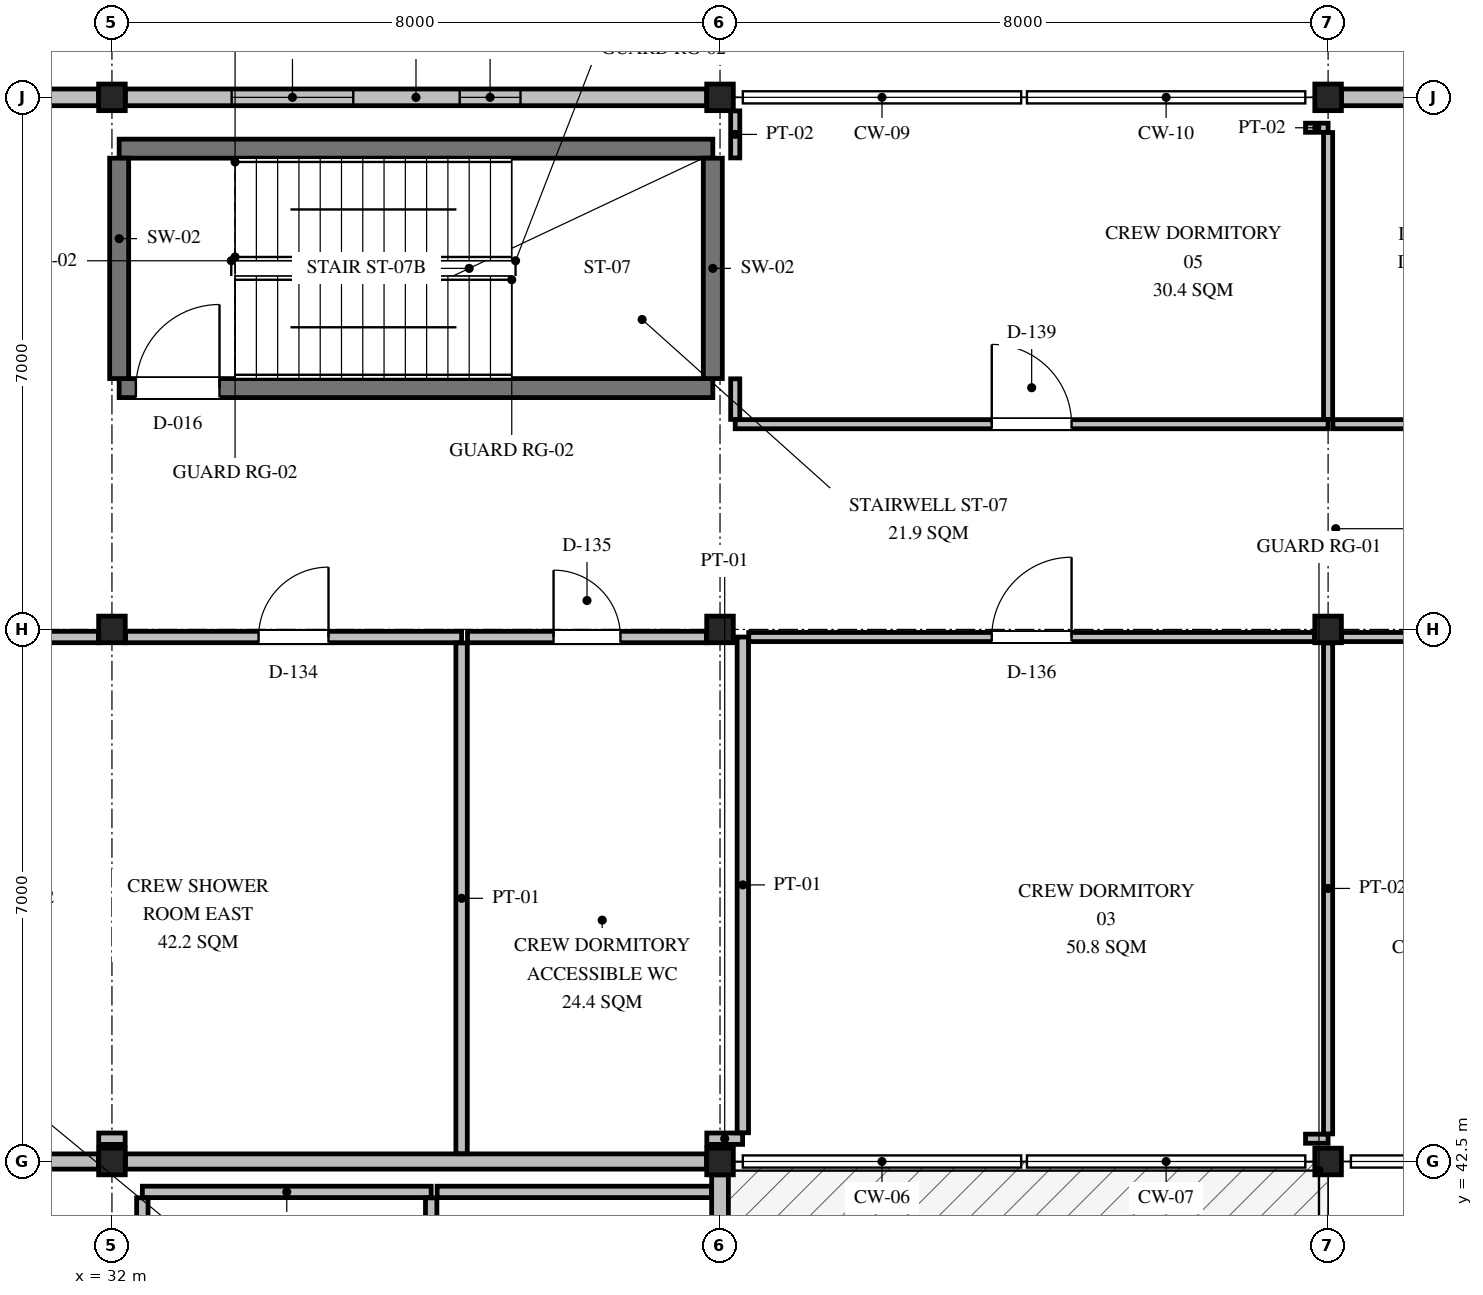
"""IFC4 building model, lengths in metres.
Left out: names, types, materials, properties, quantities, classifications, styles, units other than length and angle.
Written with IfcOpenShell. Run it as: python <this file> out.ifc"""

import sys

from ifc_helpers import new_model, si_unit, direction, frame, frame_2d, origin, origin_2d, place, context, subcontext, project, spatial, rectangle, i_section, extrude, element, fill, save


model = new_model("IFC4")
c1 = context("Model", 3, precision=1e-05, world=origin(), true_north=direction((0.0, 1.0)))
c2 = subcontext(c1, "Body", "Model", "MODEL_VIEW")
j1 = project(units=[si_unit("LENGTHUNIT", "METRE"), si_unit("PLANEANGLEUNIT", "RADIAN")], contexts=[c1])
p1 = place(None, origin())
s1 = spatial("IfcSite", under=j1, at=p1, CompositionType="ELEMENT")
p2 = place(p1, origin())
s2 = spatial("IfcBuilding", under=s1, at=p2, CompositionType="ELEMENT")
p3 = place(p2, frame((0.0, 0.0, 5.85)))
s3 = spatial("IfcBuildingStorey", under=s2, at=p3, CompositionType="ELEMENT", Elevation=5.85)
for number, where, z_axis, x_axis in (
    (1, (32.0, 42.5, 0.0), (0.0, 0.0, 1.0), (1.0, 0.0, 0.0)),
    (2, (32.0, 49.5, 0.0), (0.0, 0.0, 1.0), (1.0, 0.0, 0.0)),
    (3, (32.0, 56.5, 0.0), (0.0, 0.0, 1.0), (1.0, 0.0, 0.0)),
    (4, (40.0, 42.5, 0.0), (0.0, 0.0, 1.0), (1.0, 0.0, 0.0)),
    (5, (40.0, 49.5, 0.0), (0.0, 0.0, 1.0), (1.0, 0.0, 0.0)),
    (6, (40.0, 56.5, 0.0), (0.0, 0.0, 1.0), (1.0, 0.0, 0.0)),
    (7, (48.0, 42.5, 0.0), (0.0, 0.0, 1.0), (1.0, 0.0, 0.0)),
    (8, (48.0, 49.5, 0.0), (0.0, 0.0, 1.0), (1.0, 0.0, 0.0)),
    (9, (48.0, 56.5, 0.0), (0.0, 0.0, 1.0), (1.0, 0.0, 0.0)),
):
    element("IfcColumn", number, at=place(p3, frame(where, z_axis=z_axis, x_axis=x_axis)), inside=s3, PredefinedType="COLUMN", context=c2, shape_type="SweptSolid", body=[
        extrude(i_section(OverallWidth=0.35, OverallDepth=0.35, WebThickness=0.012, FlangeThickness=0.019, FilletRadius=0.02, at=origin_2d()), origin(), (0.0, 0.0, 1.0), 4.2),
    ])
p4 = place(p3, frame((40.0, 22.625, 0.0), z_axis=(0.0, 0.0, 1.0), x_axis=(0.0, 1.0, 0.0)))
e10 = element("IfcWall", 10, at=p4, inside=s3, PredefinedType="SOLIDWALL", context=c2, shape_type="SweptSolid", body=[
    extrude(rectangle(XDim=19.7, YDim=0.22, at=frame_2d((9.85, 0.0))), origin(), (0.0, 0.0, 1.0), 3.294),
])
p5 = place(p4, frame((14.0, 0.0, 0.0)))
e11 = element("IfcOpeningElement", 11, at=p5, cuts=e10, PredefinedType="OPENING", context=c2, shape_type="SweptSolid", body=[
    extrude(rectangle(XDim=1.15, YDim=2.2, at=frame_2d((0.575, 1.1))), frame((0.0, 0.12, 0.0), z_axis=(0.0, -1.0, 0.0), x_axis=(1.0, 0.0, 0.0)), (0.0, 0.0, 1.0), 0.24),
])
p6 = place(p4, frame((3.0, 0.0, 1.0)))
e12 = element("IfcOpeningElement", 12, at=p6, cuts=e10, PredefinedType="OPENING", context=c2, shape_type="SweptSolid", body=[
    extrude(rectangle(XDim=1.75, YDim=1.3, at=frame_2d((0.875, 0.65))), frame((0.0, 0.12, 0.0), z_axis=(0.0, -1.0, 0.0), x_axis=(1.0, 0.0, 0.0)), (0.0, 0.0, 1.0), 0.24),
])
p7 = place(p3, frame((24.175, 56.5, 0.0), z_axis=(0.0, 0.0, 1.0), x_axis=(1.0, 0.0, 0.0)))
e13 = element("IfcWall", 13, at=p7, inside=s3, PredefinedType="SOLIDWALL", context=c2, shape_type="SweptSolid", body=[
    extrude(rectangle(XDim=7.65, YDim=0.22, at=frame_2d((3.825, 0.0))), origin(), (0.0, 0.0, 1.0), 3.344),
])
p8 = place(p7, frame((1.4, 0.0, 0.95)))
e14 = element("IfcOpeningElement", 14, at=p8, cuts=e13, PredefinedType="OPENING", context=c2, shape_type="SweptSolid", body=[
    extrude(rectangle(XDim=2.4, YDim=1.5, at=frame_2d((1.2, 0.75))), frame((0.0, 0.12, 0.0), z_axis=(0.0, -1.0, 0.0), x_axis=(1.0, 0.0, 0.0)), (0.0, 0.0, 1.0), 0.24),
])
p9 = place(p7, frame((4.4, 0.0, 0.95)))
e15 = element("IfcOpeningElement", 15, at=p9, cuts=e13, PredefinedType="OPENING", context=c2, shape_type="SweptSolid", body=[
    extrude(rectangle(XDim=2.1, YDim=2.1, at=frame_2d((1.05, 1.05))), frame((0.0, 0.12, 0.0), z_axis=(0.0, -1.0, 0.0), x_axis=(1.0, 0.0, 0.0)), (0.0, 0.0, 1.0), 0.24),
])
p10 = place(p3, frame((32.175, 56.5, 0.0), z_axis=(0.0, 0.0, 1.0), x_axis=(1.0, 0.0, 0.0)))
e16 = element("IfcWall", 16, at=p10, inside=s3, PredefinedType="SOLIDWALL", context=c2, shape_type="SweptSolid", body=[
    extrude(rectangle(XDim=7.65, YDim=0.22, at=frame_2d((3.825, 0.0))), origin(), (0.0, 0.0, 1.0), 3.394),
])
p11 = place(p10, frame((1.4, 0.0, 0.95)))
e17 = element("IfcOpeningElement", 17, at=p11, cuts=e16, PredefinedType="OPENING", context=c2, shape_type="SweptSolid", body=[
    extrude(rectangle(XDim=1.6, YDim=1.8, at=frame_2d((0.8, 0.9))), frame((0.0, 0.12, 0.0), z_axis=(0.0, -1.0, 0.0), x_axis=(1.0, 0.0, 0.0)), (0.0, 0.0, 1.0), 0.24),
])
p12 = place(p10, frame((4.4, 0.0, 0.95)))
e18 = element("IfcOpeningElement", 18, at=p12, cuts=e16, PredefinedType="OPENING", context=c2, shape_type="SweptSolid", body=[
    extrude(rectangle(XDim=0.8, YDim=1.3, at=frame_2d((0.4, 0.65))), frame((0.0, 0.12, 0.0), z_axis=(0.0, -1.0, 0.0), x_axis=(1.0, 0.0, 0.0)), (0.0, 0.0, 1.0), 0.24),
])
p13 = place(p3, frame((48.175, 56.5, 0.0), z_axis=(0.0, 0.0, 1.0), x_axis=(1.0, 0.0, 0.0)))
e19 = element("IfcWall", 19, at=p13, inside=s3, PredefinedType="SOLIDWALL", context=c2, shape_type="SweptSolid", body=[
    extrude(rectangle(XDim=7.65, YDim=0.22, at=frame_2d((3.825, 0.0))), origin(), (0.0, 0.0, 1.0), 3.494),
])
p14 = place(p13, frame((1.4, 0.0, 0.95)))
e20 = element("IfcOpeningElement", 20, at=p14, cuts=e19, PredefinedType="OPENING", context=c2, shape_type="SweptSolid", body=[
    extrude(rectangle(XDim=2.8, YDim=1.8, at=frame_2d((1.4, 0.9))), frame((0.0, 0.12, 0.0), z_axis=(0.0, -1.0, 0.0), x_axis=(1.0, 0.0, 0.0)), (0.0, 0.0, 1.0), 0.24),
])
p15 = place(p13, frame((4.4, 0.0, 0.95)))
e21 = element("IfcOpeningElement", 21, at=p15, cuts=e19, PredefinedType="OPENING", context=c2, shape_type="SweptSolid", body=[
    extrude(rectangle(XDim=2.15, YDim=1.3, at=frame_2d((1.075, 0.65))), frame((0.0, 0.12, 0.0), z_axis=(0.0, -1.0, 0.0), x_axis=(1.0, 0.0, 0.0)), (0.0, 0.0, 1.0), 0.24),
])
p16 = place(p3, frame((32.095, 52.675, 0.0), z_axis=(0.0, 0.0, 1.0), x_axis=(1.0, 0.0, 0.0)))
e22 = element("IfcWall", 22, at=p16, inside=s3, PredefinedType="SHEAR", context=c2, shape_type="SweptSolid", body=[
    extrude(rectangle(XDim=7.81, YDim=0.25, at=frame_2d((3.905, 0.0))), origin(), (0.0, 0.0, 1.0), 4.0),
])
p17 = place(p16, frame((0.22, 0.0, 0.0)))
e23 = element("IfcOpeningElement", 23, at=p17, cuts=e22, PredefinedType="OPENING", context=c2, shape_type="SweptSolid", body=[
    extrude(rectangle(XDim=1.1, YDim=2.15, at=frame_2d((0.55, 1.075))), frame((0.0, 0.135, 0.0), z_axis=(0.0, -1.0, 0.0), x_axis=(1.0, 0.0, 0.0)), (0.0, 0.0, 1.0), 0.27),
])
p18 = place(p3, frame((32.095, 55.825, 0.0), z_axis=(0.0, 0.0, 1.0), x_axis=(1.0, 0.0, 0.0)))
e24 = element("IfcWall", 24, at=p18, inside=s3, PredefinedType="SHEAR", context=c2, shape_type="SweptSolid", body=[
    extrude(rectangle(XDim=7.81, YDim=0.25, at=frame_2d((3.905, 0.0))), origin(), (0.0, 0.0, 1.0), 4.0),
])
for number, where, z_axis, x_axis in (
    (25, (32.095, 52.8, 0.0), (0.0, 0.0, 1.0), (0.0, 1.0, 0.0)),
    (26, (39.905, 52.8, 0.0), (0.0, 0.0, 1.0), (0.0, 1.0, 0.0)),
):
    element("IfcWall", number, at=place(p3, frame(where, z_axis=z_axis, x_axis=x_axis)), inside=s3, PredefinedType="SHEAR", context=c2, shape_type="SweptSolid", body=[
        extrude(rectangle(XDim=2.9, YDim=0.25, at=frame_2d((1.45, 0.0))), origin(), (0.0, 0.0, 1.0), 4.0),
    ])
p19 = place(p3, frame((24.177, 42.5, 0.0), z_axis=(0.0, 0.0, 1.0), x_axis=(1.0, 0.0, 0.0)))
e27 = element("IfcWall", 27, at=p19, inside=s3, PredefinedType="PARTITIONING", context=c2, shape_type="SweptSolid", body=[
    extrude(rectangle(XDim=7.646, YDim=0.2, at=frame_2d((3.823, 0.0))), origin(), (0.0, 0.0, 1.0), 3.594),
])
p20 = place(p3, frame((32.177, 42.5, 0.0), z_axis=(0.0, 0.0, 1.0), x_axis=(1.0, 0.0, 0.0)))
e28 = element("IfcWall", 28, at=p20, inside=s3, PredefinedType="PARTITIONING", context=c2, shape_type="SweptSolid", body=[
    extrude(rectangle(XDim=7.646, YDim=0.2, at=frame_2d((3.823, 0.0))), origin(), (0.0, 0.0, 1.0), 3.604),
])
p21 = place(p3, frame((32.4, 42.1, 0.0), z_axis=(0.0, 0.0, 1.0), x_axis=(1.0, 0.0, 0.0)))
e29 = element("IfcWall", 29, at=p21, inside=s3, PredefinedType="PARTITIONING", context=c2, shape_type="SweptSolid", body=[
    extrude(rectangle(XDim=3.8, YDim=0.15, at=frame_2d((1.9, 0.0))), origin(), (0.0, 0.0, 1.0), 4.0),
])
p22 = place(p3, frame((32.4, 37.978, 0.0), z_axis=(0.0, 0.0, 1.0), x_axis=(0.0, 1.0, 0.0)))
e30 = element("IfcWall", 30, at=p22, inside=s3, PredefinedType="PARTITIONING", context=c2, shape_type="SweptSolid", body=[
    extrude(rectangle(XDim=4.044, YDim=0.15, at=frame_2d((2.022, 0.0))), origin(), (0.0, 0.0, 1.0), 4.0),
])
p23 = place(p3, frame((36.2, 37.978, 0.0), z_axis=(0.0, 0.0, 1.0), x_axis=(0.0, 1.0, 0.0)))
e31 = element("IfcWall", 31, at=p23, inside=s3, PredefinedType="PARTITIONING", context=c2, shape_type="SweptSolid", body=[
    extrude(rectangle(XDim=4.044, YDim=0.15, at=frame_2d((2.022, 0.0))), origin(), (0.0, 0.0, 1.0), 3.7),
])
p24 = place(p3, frame((36.278, 42.1, 0.0), z_axis=(0.0, 0.0, 1.0), x_axis=(1.0, 0.0, 0.0)))
e32 = element("IfcWall", 32, at=p24, inside=s3, PredefinedType="PARTITIONING", context=c2, shape_type="SweptSolid", body=[
    extrude(rectangle(XDim=3.609, YDim=0.15, at=frame_2d((1.804, 0.0))), origin(), (0.0, 0.0, 1.0), 4.0),
])
p25 = place(p3, frame((31.826, 42.8, 0.0), z_axis=(0.0, 0.0, 1.0), x_axis=(1.0, 0.0, 0.0)))
e33 = element("IfcWall", 33, at=p25, inside=s3, PredefinedType="PARTITIONING", context=c2, shape_type="SweptSolid", body=[
    extrude(rectangle(XDim=0.348, YDim=0.15, at=frame_2d((0.174, 0.0))), origin(), (0.0, 0.0, 1.0), 4.0),
])
p26 = place(p3, frame((30.263, 49.4, 0.0), z_axis=(0.0, 0.0, 1.0), x_axis=(1.0, 0.0, 0.0)))
e34 = element("IfcWall", 34, at=p26, inside=s3, PredefinedType="PARTITIONING", context=c2, shape_type="SweptSolid", body=[
    extrude(rectangle(XDim=1.559, YDim=0.15, at=frame_2d((0.78, 0.0))), origin(), (0.0, 0.0, 1.0), 3.494),
])
p27 = place(p3, frame((32.178, 49.4, 0.0), z_axis=(0.0, 0.0, 1.0), x_axis=(1.0, 0.0, 0.0)))
e35 = element("IfcWall", 35, at=p27, inside=s3, PredefinedType="PARTITIONING", context=c2, shape_type="SweptSolid", body=[
    extrude(rectangle(XDim=4.422, YDim=0.15, at=frame_2d((2.211, 0.0))), origin(), (0.0, 0.0, 1.0), 3.544),
])
p28 = place(p27, frame((1.751, 0.0, 0.0)))
e36 = element("IfcOpeningElement", 36, at=p28, cuts=e35, PredefinedType="OPENING", context=c2, shape_type="SweptSolid", body=[
    extrude(rectangle(XDim=0.92, YDim=2.1, at=frame_2d((0.46, 1.05))), frame((0.0, 0.085, 0.0), z_axis=(0.0, -1.0, 0.0), x_axis=(1.0, 0.0, 0.0)), (0.0, 0.0, 1.0), 0.17),
])
p29 = place(p3, frame((36.6, 42.603, 0.0), z_axis=(0.0, 0.0, 1.0), x_axis=(0.0, 1.0, 0.0)))
e37 = element("IfcWall", 37, at=p29, inside=s3, PredefinedType="PARTITIONING", context=c2, shape_type="SweptSolid", body=[
    extrude(rectangle(XDim=6.719, YDim=0.15, at=frame_2d((3.359, 0.0))), origin(), (0.0, 0.0, 1.0), 4.0),
])
p30 = place(p3, frame((39.826, 42.8, 0.0), z_axis=(0.0, 0.0, 1.0), x_axis=(1.0, 0.0, 0.0)))
e38 = element("IfcWall", 38, at=p30, inside=s3, PredefinedType="PARTITIONING", context=c2, shape_type="SweptSolid", body=[
    extrude(rectangle(XDim=0.471, YDim=0.15, at=frame_2d((0.236, 0.0))), origin(), (0.0, 0.0, 1.0), 4.0),
])
p31 = place(p3, frame((36.678, 49.4, 0.0), z_axis=(0.0, 0.0, 1.0), x_axis=(1.0, 0.0, 0.0)))
e39 = element("IfcWall", 39, at=p31, inside=s3, PredefinedType="PARTITIONING", context=c2, shape_type="SweptSolid", body=[
    extrude(rectangle(XDim=3.144, YDim=0.15, at=frame_2d((1.572, 0.0))), origin(), (0.0, 0.0, 1.0), 3.544),
])
p32 = place(p31, frame((1.132, 0.0, 0.0)))
e40 = element("IfcOpeningElement", 40, at=p32, cuts=e39, PredefinedType="OPENING", context=c2, shape_type="SweptSolid", body=[
    extrude(rectangle(XDim=0.88, YDim=2.1, at=frame_2d((0.44, 1.05))), frame((0.0, 0.085, 0.0), z_axis=(0.0, -1.0, 0.0), x_axis=(1.0, 0.0, 0.0)), (0.0, 0.0, 1.0), 0.17),
])
p33 = place(p3, frame((40.3, 42.878, 0.0), z_axis=(0.0, 0.0, 1.0), x_axis=(0.0, 1.0, 0.0)))
e41 = element("IfcWall", 41, at=p33, inside=s3, PredefinedType="PARTITIONING", context=c2, shape_type="SweptSolid", body=[
    extrude(rectangle(XDim=6.522, YDim=0.15, at=frame_2d((3.261, 0.0))), origin(), (0.0, 0.0, 1.0), 4.0),
])
p34 = place(p3, frame((47.703, 42.8, 0.0), z_axis=(0.0, 0.0, 1.0), x_axis=(1.0, 0.0, 0.0)))
e42 = element("IfcWall", 42, at=p34, inside=s3, PredefinedType="PARTITIONING", context=c2, shape_type="SweptSolid", body=[
    extrude(rectangle(XDim=0.297, YDim=0.12, at=frame_2d((0.148, 0.0))), origin(), (0.0, 0.0, 1.0), 4.0),
])
p35 = place(p3, frame((40.378, 49.4, 0.0), z_axis=(0.0, 0.0, 1.0), x_axis=(1.0, 0.0, 0.0)))
e43 = element("IfcWall", 43, at=p35, inside=s3, PredefinedType="PARTITIONING", context=c2, shape_type="SweptSolid", body=[
    extrude(rectangle(XDim=7.444, YDim=0.12, at=frame_2d((3.722, 0.0))), origin(), (0.0, 0.0, 1.0), 3.494),
])
p36 = place(p35, frame((3.197, 0.0, 0.0)))
e44 = element("IfcOpeningElement", 44, at=p36, cuts=e43, PredefinedType="OPENING", context=c2, shape_type="SweptSolid", body=[
    extrude(rectangle(XDim=1.05, YDim=2.1, at=frame_2d((0.525, 1.05))), frame((0.0, 0.07, 0.0), z_axis=(0.0, -1.0, 0.0), x_axis=(1.0, 0.0, 0.0)), (0.0, 0.0, 1.0), 0.14),
])
p37 = place(p3, frame((48.0, 42.863, 0.0), z_axis=(0.0, 0.0, 1.0), x_axis=(0.0, 1.0, 0.0)))
e45 = element("IfcWall", 45, at=p37, inside=s3, PredefinedType="PARTITIONING", context=c2, shape_type="SweptSolid", body=[
    extrude(rectangle(XDim=6.459, YDim=0.12, at=frame_2d((3.229, 0.0))), origin(), (0.0, 0.0, 1.0), 3.444),
])
p38 = place(p3, frame((48.178, 49.4, 0.0), z_axis=(0.0, 0.0, 1.0), x_axis=(1.0, 0.0, 0.0)))
e46 = element("IfcWall", 46, at=p38, inside=s3, PredefinedType="PARTITIONING", context=c2, shape_type="SweptSolid", body=[
    extrude(rectangle(XDim=7.644, YDim=0.12, at=frame_2d((3.822, 0.0))), origin(), (0.0, 0.0, 1.0), 3.554),
])
p39 = place(p38, frame((3.297, 0.0, 0.0)))
e47 = element("IfcOpeningElement", 47, at=p39, cuts=e46, PredefinedType="OPENING", context=c2, shape_type="SweptSolid", body=[
    extrude(rectangle(XDim=1.05, YDim=2.1, at=frame_2d((0.525, 1.05))), frame((0.0, 0.07, 0.0), z_axis=(0.0, -1.0, 0.0), x_axis=(1.0, 0.0, 0.0)), (0.0, 0.0, 1.0), 0.14),
])
p40 = place(p3, frame((40.2, 52.2, 0.0), z_axis=(0.0, 0.0, 1.0), x_axis=(1.0, 0.0, 0.0)))
e48 = element("IfcWall", 48, at=p40, inside=s3, PredefinedType="PARTITIONING", context=c2, shape_type="SweptSolid", body=[
    extrude(rectangle(XDim=7.8, YDim=0.12, at=frame_2d((3.9, 0.0))), origin(), (0.0, 0.0, 1.0), 4.0),
])
p41 = place(p40, frame((3.375, 0.0, 0.0)))
e49 = element("IfcOpeningElement", 49, at=p41, cuts=e48, PredefinedType="OPENING", context=c2, shape_type="SweptSolid", body=[
    extrude(rectangle(XDim=1.05, YDim=2.1, at=frame_2d((0.525, 1.05))), frame((0.0, 0.07, 0.0), z_axis=(0.0, -1.0, 0.0), x_axis=(1.0, 0.0, 0.0)), (0.0, 0.0, 1.0), 0.14),
])
p42 = place(p3, frame((47.703, 56.1, 0.0), z_axis=(0.0, 0.0, 1.0), x_axis=(1.0, 0.0, 0.0)))
e50 = element("IfcWall", 50, at=p42, inside=s3, PredefinedType="PARTITIONING", context=c2, shape_type="SweptSolid", body=[
    extrude(rectangle(XDim=0.297, YDim=0.12, at=frame_2d((0.148, 0.0))), origin(), (0.0, 0.0, 1.0), 4.0),
])
p43 = place(p3, frame((40.2, 52.263, 0.0), z_axis=(0.0, 0.0, 1.0), x_axis=(0.0, 1.0, 0.0)))
e51 = element("IfcWall", 51, at=p43, inside=s3, PredefinedType="PARTITIONING", context=c2, shape_type="SweptSolid", body=[
    extrude(rectangle(XDim=0.534, YDim=0.12, at=frame_2d((0.267, 0.0))), origin(), (0.0, 0.0, 1.0), 4.0),
])
p44 = place(p3, frame((40.2, 55.703, 0.0), z_axis=(0.0, 0.0, 1.0), x_axis=(0.0, 1.0, 0.0)))
e52 = element("IfcWall", 52, at=p44, inside=s3, PredefinedType="PARTITIONING", context=c2, shape_type="SweptSolid", body=[
    extrude(rectangle(XDim=0.619, YDim=0.12, at=frame_2d((0.31, 0.0))), origin(), (0.0, 0.0, 1.0), 4.0),
])
p45 = place(p3, frame((48.0, 52.263, 0.0), z_axis=(0.0, 0.0, 1.0), x_axis=(0.0, 1.0, 0.0)))
e53 = element("IfcWall", 53, at=p45, inside=s3, PredefinedType="PARTITIONING", context=c2, shape_type="SweptSolid", body=[
    extrude(rectangle(XDim=3.774, YDim=0.12, at=frame_2d((1.887, 0.0))), origin(), (0.0, 0.0, 1.0), 3.494),
])
p46 = place(p3, frame((48.063, 52.2, 0.0), z_axis=(0.0, 0.0, 1.0), x_axis=(1.0, 0.0, 0.0)))
e54 = element("IfcWall", 54, at=p46, inside=s3, PredefinedType="PARTITIONING", context=c2, shape_type="SweptSolid", body=[
    extrude(rectangle(XDim=7.824, YDim=0.12, at=frame_2d((3.912, 0.0))), origin(), (0.0, 0.0, 1.0), 4.0),
])
p47 = place(p46, frame((3.387, 0.0, 0.0)))
e55 = element("IfcOpeningElement", 55, at=p47, cuts=e54, PredefinedType="OPENING", context=c2, shape_type="SweptSolid", body=[
    extrude(rectangle(XDim=1.05, YDim=2.1, at=frame_2d((0.525, 1.05))), frame((0.0, 0.07, 0.0), z_axis=(0.0, -1.0, 0.0), x_axis=(1.0, 0.0, 0.0)), (0.0, 0.0, 1.0), 0.14),
])
p48 = place(p11, origin())
e56 = element("IfcWindow", 56, at=p48, inside=s3, PartitioningType="SINGLE_PANEL", PredefinedType="WINDOW", context=c2, shape_type="SweptSolid", body=[
    extrude(rectangle(XDim=1.6, YDim=1.8, at=frame_2d((0.8, 0.9))), frame((0.0, 0.03, 0.0), z_axis=(0.0, -1.0, 0.0), x_axis=(1.0, 0.0, 0.0)), (0.0, 0.0, 1.0), 0.06),
])
fill(e17, e56)
p49 = place(p12, origin())
e57 = element("IfcWindow", 57, at=p49, inside=s3, PartitioningType="SINGLE_PANEL", PredefinedType="WINDOW", context=c2, shape_type="SweptSolid", body=[
    extrude(rectangle(XDim=0.8, YDim=1.3, at=frame_2d((0.4, 0.65))), frame((0.0, 0.03, 0.0), z_axis=(0.0, -1.0, 0.0), x_axis=(1.0, 0.0, 0.0)), (0.0, 0.0, 1.0), 0.06),
])
fill(e18, e57)
p50 = place(p17, frame((1.1, 0.0, 0.0), z_axis=(0.0, 0.0, 1.0), x_axis=(-1.0, 0.0, 0.0)))
e58 = element("IfcDoor", 58, at=p50, inside=s3, OperationType="SINGLE_SWING_RIGHT", PredefinedType="DOOR", context=c2, shape_type="SweptSolid", body=[
    extrude(rectangle(XDim=1.1, YDim=2.15, at=frame_2d((0.55, 1.075))), frame((0.0, 0.025, 0.0), z_axis=(0.0, -1.0, 0.0), x_axis=(1.0, 0.0, 0.0)), (0.0, 0.0, 1.0), 0.05),
])
fill(e23, e58)
p51 = place(p28, origin())
e59 = element("IfcDoor", 59, at=p51, inside=s3, OperationType="SINGLE_SWING_RIGHT", PredefinedType="DOOR", context=c2, shape_type="SweptSolid", body=[
    extrude(rectangle(XDim=0.92, YDim=2.1, at=frame_2d((0.46, 1.05))), frame((0.0, 0.025, 0.0), z_axis=(0.0, -1.0, 0.0), x_axis=(1.0, 0.0, 0.0)), (0.0, 0.0, 1.0), 0.05),
])
fill(e36, e59)
p52 = place(p32, origin())
e60 = element("IfcDoor", 60, at=p52, inside=s3, OperationType="SINGLE_SWING_LEFT", PredefinedType="DOOR", context=c2, shape_type="SweptSolid", body=[
    extrude(rectangle(XDim=0.88, YDim=2.1, at=frame_2d((0.44, 1.05))), frame((0.0, 0.025, 0.0), z_axis=(0.0, -1.0, 0.0), x_axis=(1.0, 0.0, 0.0)), (0.0, 0.0, 1.0), 0.05),
])
fill(e40, e60)
p53 = place(p36, origin())
e61 = element("IfcDoor", 61, at=p53, inside=s3, OperationType="SINGLE_SWING_RIGHT", PredefinedType="DOOR", context=c2, shape_type="SweptSolid", body=[
    extrude(rectangle(XDim=1.05, YDim=2.1, at=frame_2d((0.525, 1.05))), frame((0.0, 0.025, 0.0), z_axis=(0.0, -1.0, 0.0), x_axis=(1.0, 0.0, 0.0)), (0.0, 0.0, 1.0), 0.05),
])
fill(e44, e61)
p54 = place(p41, origin())
e62 = element("IfcDoor", 62, at=p54, inside=s3, OperationType="SINGLE_SWING_LEFT", PredefinedType="DOOR", context=c2, shape_type="SweptSolid", body=[
    extrude(rectangle(XDim=1.05, YDim=2.1, at=frame_2d((0.525, 1.05))), frame((0.0, 0.025, 0.0), z_axis=(0.0, -1.0, 0.0), x_axis=(1.0, 0.0, 0.0)), (0.0, 0.0, 1.0), 0.05),
])
fill(e49, e62)
save(model, sys.argv[1])
